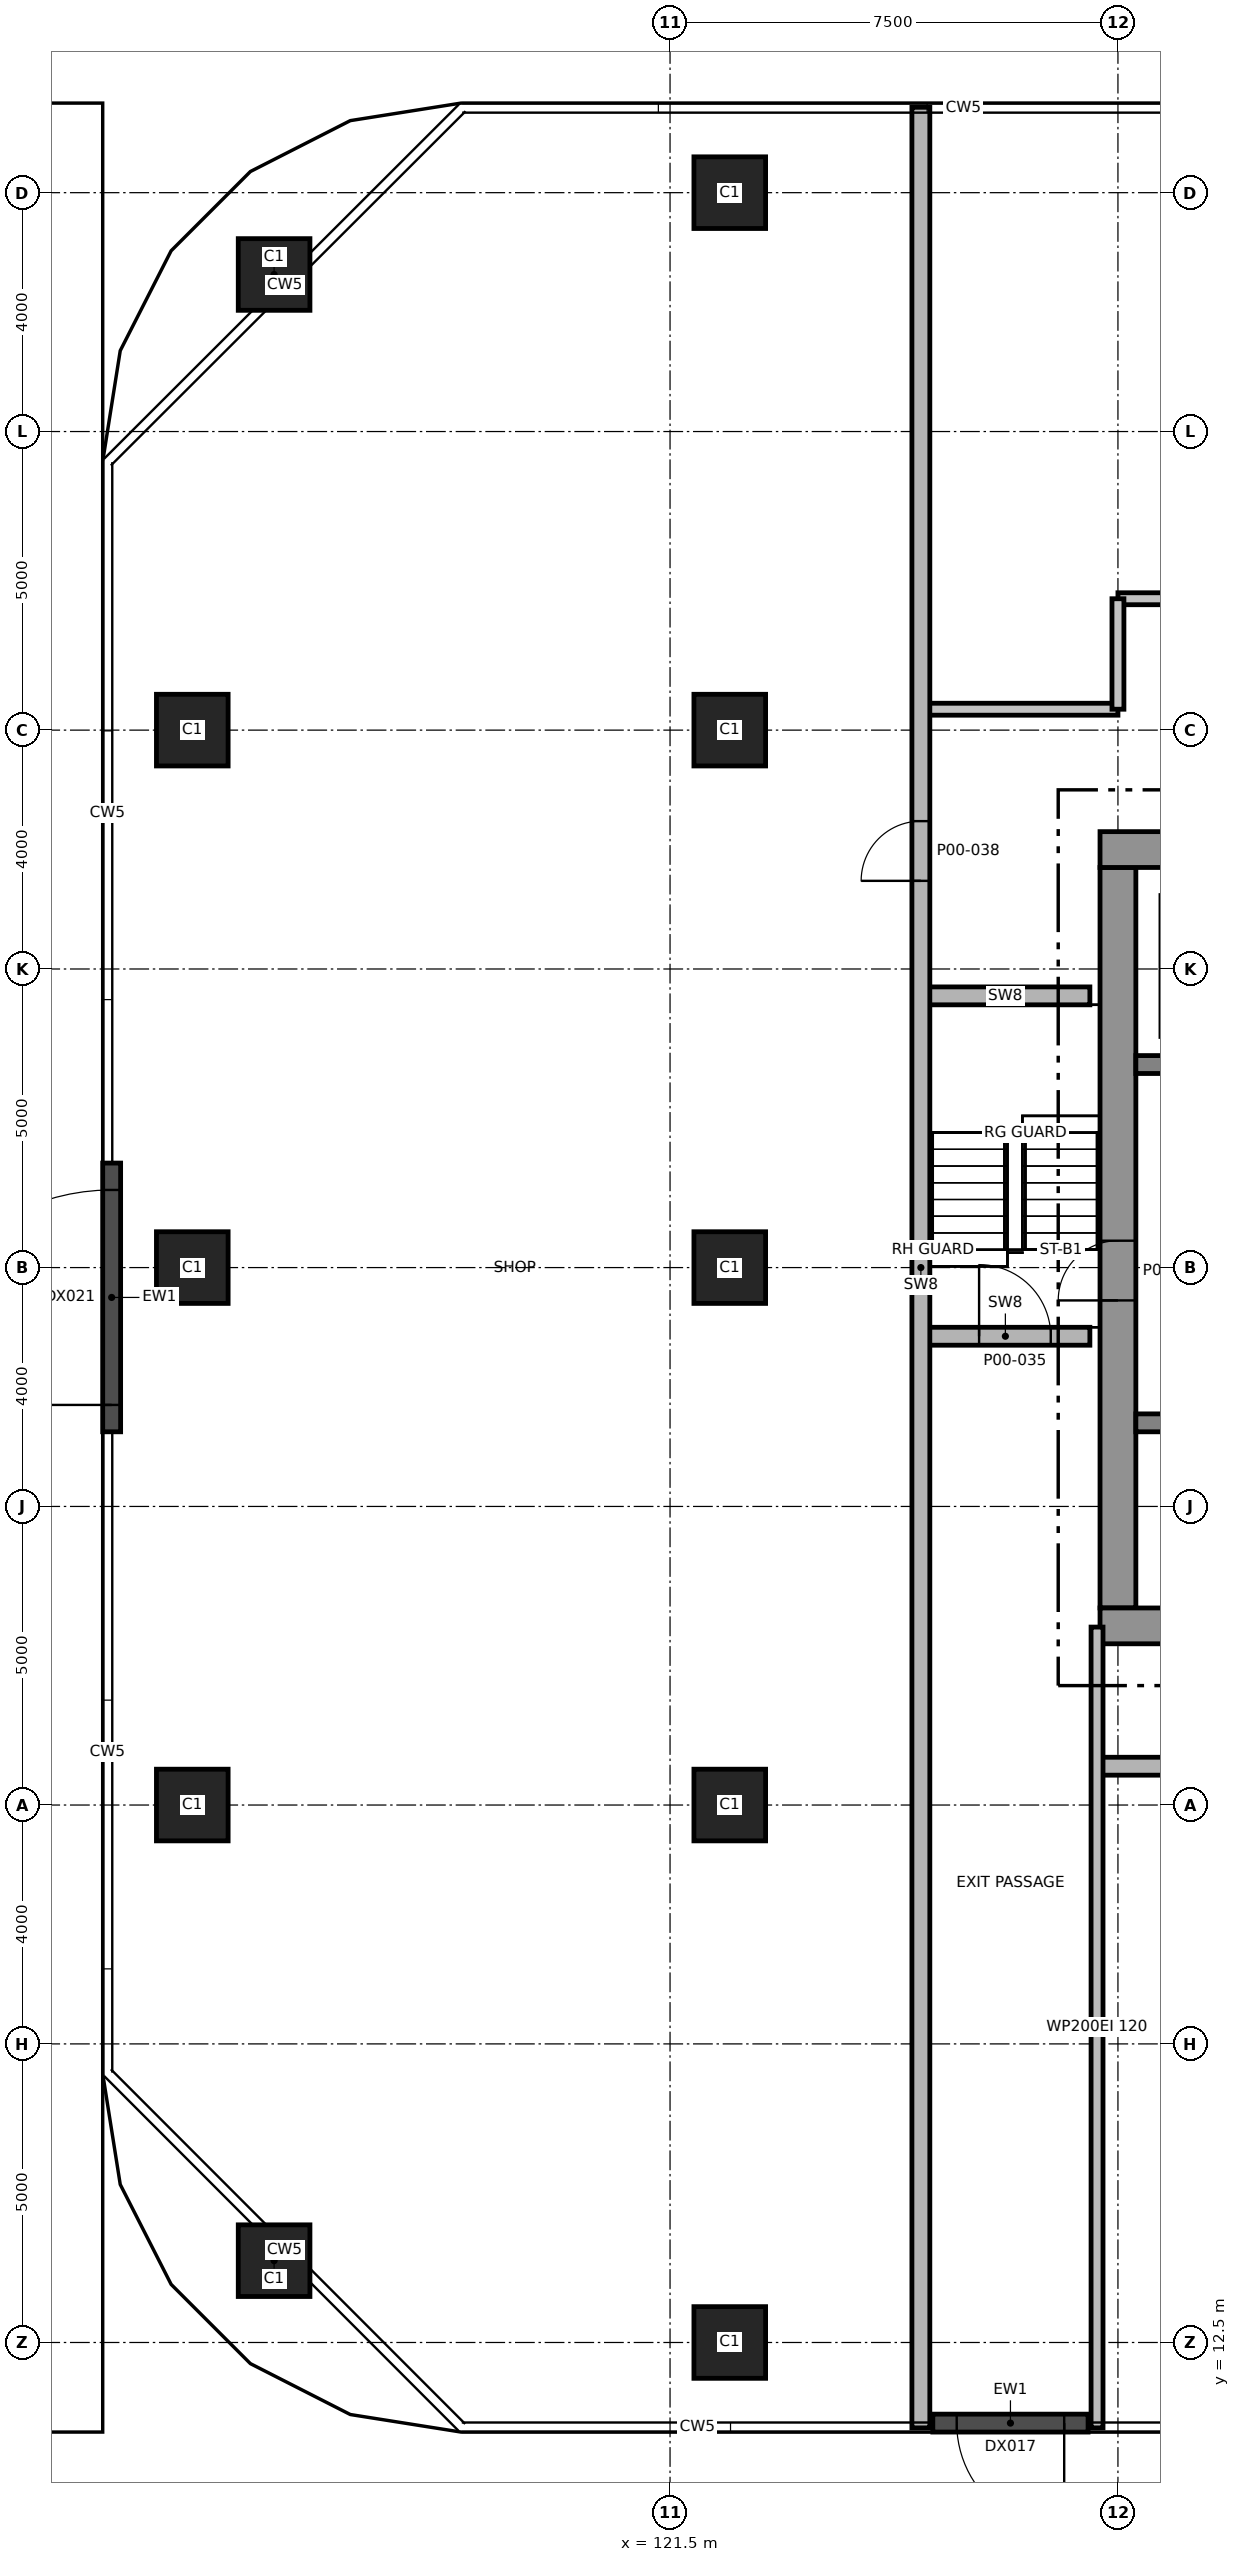
"""IFC4 building model, lengths in metres.
Left out: names, types, materials, properties, quantities, classifications, styles, units other than length and angle.
Written with IfcOpenShell. Run it as: python <this file> out.ifc"""

import sys

from ifc_helpers import new_model, si_unit, direction, frame, frame_2d, origin, origin_2d, place, context, subcontext, project, spatial, rectangle, extrude, element, fill, save


model = new_model("IFC4")
c1 = context("Model", 3, precision=1e-05, world=origin(), true_north=direction((0.0, 1.0)))
c2 = subcontext(c1, "Body", "Model", "MODEL_VIEW")
j1 = project(units=[si_unit("LENGTHUNIT", "METRE"), si_unit("PLANEANGLEUNIT", "RADIAN")], contexts=[c1])
p1 = place(None, origin())
s1 = spatial("IfcSite", under=j1, at=p1, CompositionType="ELEMENT")
p2 = place(p1, origin())
s2 = spatial("IfcBuilding", under=s1, at=p2, CompositionType="ELEMENT")
p3 = place(p2, origin())
s3 = spatial("IfcBuildingStorey", under=s2, at=p3, CompositionType="ELEMENT", Elevation=0.0)
p4 = place(p3, frame((129.0, 24.8, 0.0), z_axis=(0.0, 0.0, 1.0), x_axis=(0.0, 1.0, 0.0)))
e1 = element("IfcWall", 1, at=p4, inside=s3, PredefinedType="SHEAR", context=c2, shape_type="SweptSolid", body=[
    extrude(rectangle(XDim=12.4, YDim=0.6, at=frame_2d((6.2, 0.0))), origin(), (0.0, 0.0, 1.0), 8.0),
])
p5 = place(p4, frame((5.15, 0.0, 0.0)))
e2 = element("IfcOpeningElement", 2, at=p5, cuts=e1, PredefinedType="OPENING", context=c2, shape_type="SweptSolid", body=[
    extrude(rectangle(XDim=1.0, YDim=2.1, at=frame_2d((0.5, 1.05))), frame((0.0, 0.31, 0.0), z_axis=(0.0, -1.0, 0.0), x_axis=(1.0, 0.0, 0.0)), (0.0, 0.0, 1.0), 0.62),
])
p6 = place(p3, frame((128.7, 24.5, 0.0), z_axis=(0.0, 0.0, 1.0), x_axis=(1.0, 0.0, 0.0)))
e3 = element("IfcWall", 3, at=p6, inside=s3, PredefinedType="SHEAR", context=c2, shape_type="SweptSolid", body=[
    extrude(rectangle(XDim=15.0, YDim=0.6, at=frame_2d((7.5, 0.0))), origin(), (0.0, 0.0, 1.0), 8.0),
])
p7 = place(p6, frame((9.65, 0.0, 0.0)))
e4 = element("IfcOpeningElement", 4, at=p7, cuts=e3, PredefinedType="OPENING", context=c2, shape_type="SweptSolid", body=[
    extrude(rectangle(XDim=1.5, YDim=2.1, at=frame_2d((0.75, 1.05))), frame((0.0, 0.31, 0.0), z_axis=(0.0, -1.0, 0.0), x_axis=(1.0, 0.0, 0.0)), (0.0, 0.0, 1.0), 0.62),
])
p8 = place(p6, frame((1.25, 0.0, 0.0)))
e5 = element("IfcOpeningElement", 5, at=p8, cuts=e3, PredefinedType="OPENING", context=c2, shape_type="SweptSolid", body=[
    extrude(rectangle(XDim=0.9, YDim=2.1, at=frame_2d((0.45, 1.05))), frame((0.0, 0.31, 0.0), z_axis=(0.0, -1.0, 0.0), x_axis=(1.0, 0.0, 0.0)), (0.0, 0.0, 1.0), 0.62),
])
p9 = place(p3, frame((128.7, 37.5, 0.0), z_axis=(0.0, 0.0, 1.0), x_axis=(1.0, 0.0, 0.0)))
e6 = element("IfcWall", 6, at=p9, inside=s3, PredefinedType="SHEAR", context=c2, shape_type="SweptSolid", body=[
    extrude(rectangle(XDim=15.0, YDim=0.6, at=frame_2d((7.5, 0.0))), origin(), (0.0, 0.0, 1.0), 8.0),
])
p10 = place(p9, frame((9.65, 0.0, 0.0)))
e7 = element("IfcOpeningElement", 7, at=p10, cuts=e6, PredefinedType="OPENING", context=c2, shape_type="SweptSolid", body=[
    extrude(rectangle(XDim=1.5, YDim=2.1, at=frame_2d((0.75, 1.05))), frame((0.0, 0.31, 0.0), z_axis=(0.0, -1.0, 0.0), x_axis=(1.0, 0.0, 0.0)), (0.0, 0.0, 1.0), 0.62),
])
p11 = place(p9, frame((12.85, 0.0, 0.0)))
e8 = element("IfcOpeningElement", 8, at=p11, cuts=e6, PredefinedType="OPENING", context=c2, shape_type="SweptSolid", body=[
    extrude(rectangle(XDim=0.9, YDim=2.1, at=frame_2d((0.45, 1.05))), frame((0.0, 0.31, 0.0), z_axis=(0.0, -1.0, 0.0), x_axis=(1.0, 0.0, 0.0)), (0.0, 0.0, 1.0), 0.62),
])
p12 = place(p9, frame((5.55, 0.0, 0.0)))
e9 = element("IfcOpeningElement", 9, at=p12, cuts=e6, PredefinedType="OPENING", context=c2, shape_type="SweptSolid", body=[
    extrude(rectangle(XDim=0.9, YDim=2.1, at=frame_2d((0.45, 1.05))), frame((0.0, 0.31, 0.0), z_axis=(0.0, -1.0, 0.0), x_axis=(1.0, 0.0, 0.0)), (0.0, 0.0, 1.0), 0.62),
])
p13 = place(p3, frame((129.3, 27.9, 0.0), z_axis=(0.0, 0.0, 1.0), x_axis=(1.0, 0.0, 0.0)))
e10 = element("IfcWall", 10, at=p13, inside=s3, PredefinedType="SHEAR", context=c2, shape_type="SweptSolid", body=[
    extrude(rectangle(XDim=2.65, YDim=0.3, at=frame_2d((1.325, 0.0))), origin(), (0.0, 0.0, 1.0), 8.0),
])
p14 = place(p3, frame((129.3, 33.9, 0.0), z_axis=(0.0, 0.0, 1.0), x_axis=(1.0, 0.0, 0.0)))
e11 = element("IfcWall", 11, at=p14, inside=s3, PredefinedType="SHEAR", context=c2, shape_type="SweptSolid", body=[
    extrude(rectangle(XDim=2.65, YDim=0.3, at=frame_2d((1.325, 0.0))), origin(), (0.0, 0.0, 1.0), 8.0),
])
p15 = place(p14, frame((1.05, 0.0, 0.0)))
e12 = element("IfcOpeningElement", 12, at=p15, cuts=e11, PredefinedType="OPENING", context=c2, shape_type="SweptSolid", body=[
    extrude(rectangle(XDim=1.3, YDim=2.4, at=frame_2d((0.65, 1.2))), frame((0.0, 0.16, 0.0), z_axis=(0.0, -1.0, 0.0), x_axis=(1.0, 0.0, 0.0)), (0.0, 0.0, 1.0), 0.32),
])
for number, where, z_axis, x_axis in (
    (13, (122.5, 12.5, 0.0), (0.0, 0.0, 1.0), (1.0, 0.0, 0.0)),
    (14, (114.87, 13.87, 0.0), (0.0, 0.0, 1.0), (1.0, 0.0, 0.0)),
    (15, (113.5, 21.5, 0.0), (0.0, 0.0, 1.0), (1.0, 0.0, 0.0)),
    (16, (122.5, 21.5, 0.0), (0.0, 0.0, 1.0), (1.0, 0.0, 0.0)),
    (17, (113.5, 30.5, 0.0), (0.0, 0.0, 1.0), (1.0, 0.0, 0.0)),
    (18, (122.5, 30.5, 0.0), (0.0, 0.0, 1.0), (1.0, 0.0, 0.0)),
    (19, (113.5, 39.5, 0.0), (0.0, 0.0, 1.0), (1.0, 0.0, 0.0)),
    (20, (122.5, 39.5, 0.0), (0.0, 0.0, 1.0), (1.0, 0.0, 0.0)),
    (21, (114.87, 47.13, 0.0), (0.0, 0.0, 1.0), (1.0, 0.0, 0.0)),
    (22, (122.5, 48.5, 0.0), (0.0, 0.0, 1.0), (1.0, 0.0, 0.0)),
):
    element("IfcColumn", number, at=place(p3, frame(where, z_axis=z_axis, x_axis=x_axis)), inside=s3, PredefinedType="COLUMN", context=c2, shape_type="SweptSolid", body=[
        extrude(rectangle(XDim=1.2, YDim=1.2, at=origin_2d()), origin(), (0.0, 0.0, 1.0), 8.0),
    ])
p16 = place(p3, frame((128.5, 11.15, 0.0), z_axis=(0.0, 0.0, 1.0), x_axis=(-1.0, 0.0, 0.0)))
e23 = element("IfcWall", 23, at=p16, inside=s3, PredefinedType="SOLIDWALL", context=c2, shape_type="SweptSolid", body=[
    extrude(rectangle(XDim=2.6, YDim=0.3, at=frame_2d((1.3, 0.0))), origin(), (0.0, 0.0, 1.0), 7.7),
])
p17 = place(p16, frame((0.4, 0.0, 0.0)))
e24 = element("IfcOpeningElement", 24, at=p17, cuts=e23, PredefinedType="OPENING", context=c2, shape_type="SweptSolid", body=[
    extrude(rectangle(XDim=1.8, YDim=2.4, at=frame_2d((0.9, 1.2))), frame((0.0, 0.16, 0.0), z_axis=(0.0, -1.0, 0.0), x_axis=(1.0, 0.0, 0.0)), (0.0, 0.0, 1.0), 0.32),
])
p18 = place(p3, frame((112.15, 27.75, 0.0), z_axis=(0.0, 0.0, 1.0), x_axis=(0.0, 1.0, 0.0)))
e25 = element("IfcWall", 25, at=p18, inside=s3, PredefinedType="SOLIDWALL", context=c2, shape_type="SweptSolid", body=[
    extrude(rectangle(XDim=4.5, YDim=0.3, at=frame_2d((2.25, 0.0))), origin(), (0.0, 0.0, 1.0), 7.7),
])
p19 = place(p18, frame((0.45, 0.0, 0.0)))
e26 = element("IfcOpeningElement", 26, at=p19, cuts=e25, PredefinedType="OPENING", context=c2, shape_type="SweptSolid", body=[
    extrude(rectangle(XDim=3.6, YDim=3.0, at=frame_2d((1.8, 1.5))), frame((0.0, 0.16, 0.0), z_axis=(0.0, -1.0, 0.0), x_axis=(1.0, 0.0, 0.0)), (0.0, 0.0, 1.0), 0.32),
])
p20 = place(p3, frame((128.65, 22.15, 0.0), z_axis=(0.0, 0.0, 1.0), x_axis=(1.0, 0.0, 0.0)))
e27 = element("IfcWall", 27, at=p20, inside=s3, PredefinedType="SHEAR", context=c2, shape_type="SweptSolid", body=[
    extrude(rectangle(XDim=18.6, YDim=0.3, at=frame_2d((9.3, 0.0))), origin(), (0.0, 0.0, 1.0), 7.7),
])
p21 = place(p20, frame((14.1, 0.0, 0.0)))
e28 = element("IfcOpeningElement", 28, at=p21, cuts=e27, PredefinedType="OPENING", context=c2, shape_type="SweptSolid", body=[
    extrude(rectangle(XDim=1.0, YDim=2.1, at=frame_2d((0.5, 1.05))), frame((0.0, 0.16, 0.0), z_axis=(0.0, -1.0, 0.0), x_axis=(1.0, 0.0, 0.0)), (0.0, 0.0, 1.0), 0.32),
])
p22 = place(p3, frame((125.7, 29.35, 0.0), z_axis=(0.0, 0.0, 1.0), x_axis=(1.0, 0.0, 0.0)))
e29 = element("IfcWall", 29, at=p22, inside=s3, PredefinedType="SHEAR", context=c2, shape_type="SweptSolid", body=[
    extrude(rectangle(XDim=2.83, YDim=0.3, at=frame_2d((1.415, 0.0))), origin(), (0.0, 0.0, 1.0), 7.7),
])
p23 = place(p22, frame((0.975, 0.0, 0.0)))
e30 = element("IfcOpeningElement", 30, at=p23, cuts=e29, PredefinedType="OPENING", context=c2, shape_type="SweptSolid", body=[
    extrude(rectangle(XDim=1.2, YDim=2.1, at=frame_2d((0.6, 1.05))), frame((0.0, 0.16, 0.0), z_axis=(0.0, -1.0, 0.0), x_axis=(1.0, 0.0, 0.0)), (0.0, 0.0, 1.0), 0.32),
])
p24 = place(p3, frame((125.7, 35.05, 0.0), z_axis=(0.0, 0.0, 1.0), x_axis=(1.0, 0.0, 0.0)))
e31 = element("IfcWall", 31, at=p24, inside=s3, PredefinedType="SHEAR", context=c2, shape_type="SweptSolid", body=[
    extrude(rectangle(XDim=2.83, YDim=0.3, at=frame_2d((1.415, 0.0))), origin(), (0.0, 0.0, 1.0), 7.7),
])
p25 = place(p3, frame((125.75, 39.85, 0.0), z_axis=(0.0, 0.0, 1.0), x_axis=(1.0, 0.0, 0.0)))
e32 = element("IfcWall", 32, at=p25, inside=s3, PredefinedType="PARTITIONING", context=c2, shape_type="SweptSolid", body=[
    extrude(rectangle(XDim=3.25, YDim=0.2, at=frame_2d((1.625, 0.0))), origin(), (0.0, 0.0, 1.0), 7.7),
])
p26 = place(p3, frame((129.0, 41.7, 0.0), z_axis=(0.0, 0.0, 1.0), x_axis=(1.0, 0.0, 0.0)))
e33 = element("IfcWall", 33, at=p26, inside=s3, PredefinedType="PARTITIONING", context=c2, shape_type="SweptSolid", body=[
    extrude(rectangle(XDim=5.0, YDim=0.2, at=frame_2d((2.5, 0.0))), origin(), (0.0, 0.0, 1.0), 7.7),
])
p27 = place(p26, frame((3.8, 0.0, 0.0)))
e34 = element("IfcOpeningElement", 34, at=p27, cuts=e33, PredefinedType="OPENING", context=c2, shape_type="SweptSolid", body=[
    extrude(rectangle(XDim=1.0, YDim=2.1, at=frame_2d((0.5, 1.05))), frame((0.0, 0.11, 0.0), z_axis=(0.0, -1.0, 0.0), x_axis=(1.0, 0.0, 0.0)), (0.0, 0.0, 1.0), 0.22),
])
p28 = place(p3, frame((125.7, 11.07, 0.0), z_axis=(0.0, 0.0, 1.0), x_axis=(0.0, 1.0, 0.0)))
e35 = element("IfcWall", 35, at=p28, inside=s3, PredefinedType="SHEAR", context=c2, shape_type="SweptSolid", body=[
    extrude(rectangle(XDim=38.86, YDim=0.3, at=frame_2d((19.43, 0.0))), origin(), (0.0, 0.0, 1.0), 7.7),
])
p29 = place(p28, frame((25.906, 0.0, 0.0)))
e36 = element("IfcOpeningElement", 36, at=p29, cuts=e35, PredefinedType="OPENING", context=c2, shape_type="SweptSolid", body=[
    extrude(rectangle(XDim=1.0, YDim=2.1, at=frame_2d((0.5, 1.05))), frame((0.0, 0.16, 0.0), z_axis=(0.0, -1.0, 0.0), x_axis=(1.0, 0.0, 0.0)), (0.0, 0.0, 1.0), 0.32),
])
p30 = place(p3, frame((128.65, 11.07, 0.0), z_axis=(0.0, 0.0, 1.0), x_axis=(0.0, 1.0, 0.0)))
e37 = element("IfcWall", 37, at=p30, inside=s3, PredefinedType="PARTITIONING", context=c2, shape_type="SweptSolid", body=[
    extrude(rectangle(XDim=13.41, YDim=0.2, at=frame_2d((6.705, 0.0))), origin(), (0.0, 0.0, 1.0), 6.8),
])
p31 = place(p3, frame((129.0, 39.85, 0.0), z_axis=(0.0, 0.0, 1.0), x_axis=(0.0, 1.0, 0.0)))
e38 = element("IfcWall", 38, at=p31, inside=s3, PredefinedType="PARTITIONING", context=c2, shape_type="SweptSolid", body=[
    extrude(rectangle(XDim=1.85, YDim=0.2, at=frame_2d((0.925, 0.0))), origin(), (0.0, 0.0, 1.0), 7.7),
])
p32 = place(p17, origin())
e39 = element("IfcDoor", 39, at=p32, inside=s3, OperationType="SINGLE_SWING_LEFT", PredefinedType="DOOR", context=c2, shape_type="SweptSolid", body=[
    extrude(rectangle(XDim=1.8, YDim=2.4, at=frame_2d((0.9, 1.2))), frame((0.0, 0.025, 0.0), z_axis=(0.0, -1.0, 0.0), x_axis=(1.0, 0.0, 0.0)), (0.0, 0.0, 1.0), 0.05),
])
fill(e24, e39)
p33 = place(p19, origin())
e40 = element("IfcDoor", 40, at=p33, inside=s3, OperationType="SINGLE_SWING_LEFT", PredefinedType="DOOR", context=c2, shape_type="SweptSolid", body=[
    extrude(rectangle(XDim=3.6, YDim=3.0, at=frame_2d((1.8, 1.5))), frame((0.0, 0.025, 0.0), z_axis=(0.0, -1.0, 0.0), x_axis=(1.0, 0.0, 0.0)), (0.0, 0.0, 1.0), 0.05),
])
fill(e26, e40)
p34 = place(p23, origin())
e41 = element("IfcDoor", 41, at=p34, inside=s3, OperationType="SINGLE_SWING_LEFT", PredefinedType="DOOR", context=c2, shape_type="SweptSolid", body=[
    extrude(rectangle(XDim=1.2, YDim=2.1, at=frame_2d((0.6, 1.05))), frame((0.0, 0.025, 0.0), z_axis=(0.0, -1.0, 0.0), x_axis=(1.0, 0.0, 0.0)), (0.0, 0.0, 1.0), 0.05),
])
fill(e30, e41)
p35 = place(p29, origin())
e42 = element("IfcDoor", 42, at=p35, inside=s3, OperationType="SINGLE_SWING_RIGHT", PredefinedType="DOOR", context=c2, shape_type="SweptSolid", body=[
    extrude(rectangle(XDim=1.0, YDim=2.1, at=frame_2d((0.5, 1.05))), frame((0.0, 0.025, 0.0), z_axis=(0.0, -1.0, 0.0), x_axis=(1.0, 0.0, 0.0)), (0.0, 0.0, 1.0), 0.05),
])
fill(e36, e42)
p36 = place(p5, origin())
e43 = element("IfcDoor", 43, at=p36, inside=s3, OperationType="SINGLE_SWING_RIGHT", PredefinedType="DOOR", context=c2, shape_type="SweptSolid", body=[
    extrude(rectangle(XDim=1.0, YDim=2.1, at=frame_2d((0.5, 1.05))), frame((0.0, 0.025, 0.0), z_axis=(0.0, -1.0, 0.0), x_axis=(1.0, 0.0, 0.0)), (0.0, 0.0, 1.0), 0.05),
])
fill(e2, e43)
save(model, sys.argv[1])
